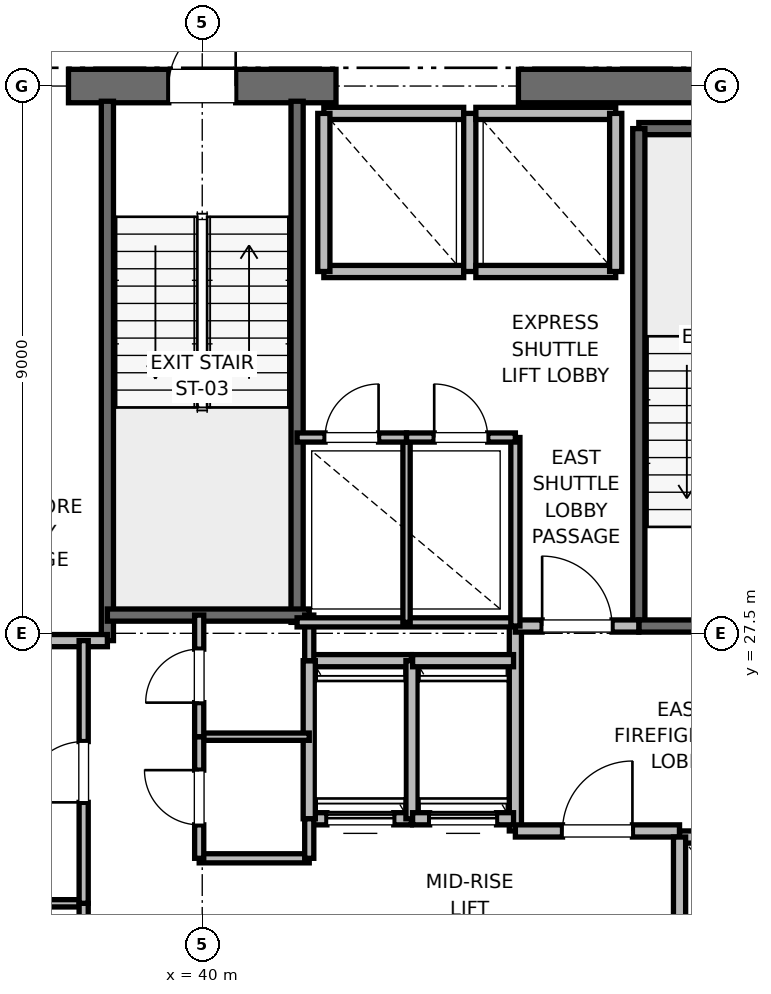
"""IFC4 building model, lengths in metres.
Left out: names, types, materials, properties, quantities, classifications, styles, units other than length and angle.
Written with IfcOpenShell. Run it as: python <this file> out.ifc"""

import sys

from ifc_helpers import new_model, si_unit, direction, frame, frame_2d, origin, place, context, subcontext, project, spatial, rectangle, extrude, element, fill, save


model = new_model("IFC4")
c1 = context("Model", 3, precision=1e-05, world=origin(), true_north=direction((0.0, 1.0)))
c2 = subcontext(c1, "Body", "Model", "MODEL_VIEW")
j1 = project(units=[si_unit("LENGTHUNIT", "METRE"), si_unit("PLANEANGLEUNIT", "RADIAN")], contexts=[c1])
p1 = place(None, origin())
s1 = spatial("IfcSite", under=j1, at=p1, CompositionType="ELEMENT")
p2 = place(p1, origin())
s2 = spatial("IfcBuilding", under=s1, at=p2, CompositionType="ELEMENT")
p3 = place(p2, frame((0.0, 0.0, 168.4)))
s3 = spatial("IfcBuildingStorey", under=s2, at=p3, CompositionType="ELEMENT", Elevation=168.4)
p4 = place(p3, frame((37.8, 36.5, 0.0), z_axis=(0.0, 0.0, 1.0), x_axis=(1.0, 0.0, 0.0)))
e1 = element("IfcWall", 1, at=p4, inside=s3, PredefinedType="SHEAR", context=c2, shape_type="SweptSolid", body=[
    extrude(rectangle(XDim=4.4, YDim=0.55, at=frame_2d((2.2, 0.0))), origin(), (0.0, 0.0, 1.0), 3.775),
])
p5 = place(p4, frame((1.65, 0.0, 0.0)))
e2 = element("IfcOpeningElement", 2, at=p5, cuts=e1, PredefinedType="OPENING", context=c2, shape_type="SweptSolid", body=[
    extrude(rectangle(XDim=1.1, YDim=2.15, at=frame_2d((0.55, 1.075))), frame((0.0, 0.275, 0.0), z_axis=(0.0, -1.0, 0.0), x_axis=(1.0, 0.0, 0.0)), (0.0, 0.0, 1.0), 0.55),
])
p6 = place(p3, frame((45.2, 36.5, 0.0), z_axis=(0.0, 0.0, 1.0), x_axis=(1.0, 0.0, 0.0)))
e3 = element("IfcWall", 3, at=p6, inside=s3, PredefinedType="SHEAR", context=c2, shape_type="SweptSolid", body=[
    extrude(rectangle(XDim=5.8, YDim=0.55, at=frame_2d((2.9, 0.0))), origin(), (0.0, 0.0, 1.0), 3.775),
])
p7 = place(p3, frame((47.18, 35.8, 0.0), z_axis=(0.0, 0.0, 1.0), x_axis=(1.0, 0.0, 0.0)))
e4 = element("IfcWall", 4, at=p7, inside=s3, PredefinedType="SOLIDWALL", context=c2, shape_type="SweptSolid", body=[
    extrude(rectangle(XDim=3.12, YDim=0.2, at=frame_2d((1.56, 0.0))), origin(), (0.0, 0.0, 1.0), 3.775),
])
p8 = place(p3, frame((47.18, 27.62, 0.0), z_axis=(0.0, 0.0, 1.0), x_axis=(0.0, 1.0, 0.0)))
e5 = element("IfcWall", 5, at=p8, inside=s3, PredefinedType="SOLIDWALL", context=c2, shape_type="SweptSolid", body=[
    extrude(rectangle(XDim=8.18, YDim=0.2, at=frame_2d((4.09, 0.0))), origin(), (0.0, 0.0, 1.0), 3.775),
])
p9 = place(p3, frame((47.18, 27.62, 0.0), z_axis=(0.0, 0.0, 1.0), x_axis=(1.0, 0.0, 0.0)))
e6 = element("IfcWall", 6, at=p9, inside=s3, PredefinedType="SOLIDWALL", context=c2, shape_type="SweptSolid", body=[
    extrude(rectangle(XDim=3.12, YDim=0.2, at=frame_2d((1.56, 0.0))), origin(), (0.0, 0.0, 1.0), 3.775),
])
p10 = place(p9, frame((1.01, 0.0, 0.0)))
e7 = element("IfcOpeningElement", 7, at=p10, cuts=e6, PredefinedType="OPENING", context=c2, shape_type="SweptSolid", body=[
    extrude(rectangle(XDim=1.1, YDim=2.15, at=frame_2d((0.55, 1.075))), frame((0.0, 0.1, 0.0), z_axis=(0.0, -1.0, 0.0), x_axis=(1.0, 0.0, 0.0)), (0.0, 0.0, 1.0), 0.2),
])
p11 = place(p3, frame((38.44, 27.38, 0.0), z_axis=(0.0, 0.0, 1.0), x_axis=(0.0, 1.0, 0.0)))
e8 = element("IfcWall", 8, at=p11, inside=s3, PredefinedType="SOLIDWALL", context=c2, shape_type="SweptSolid", body=[
    extrude(rectangle(XDim=8.87, YDim=0.2, at=frame_2d((4.435, 0.0))), origin(), (0.0, 0.0, 1.0), 3.775),
])
p12 = place(p3, frame((41.56, 27.68, 0.0), z_axis=(0.0, 0.0, 1.0), x_axis=(0.0, 1.0, 0.0)))
e9 = element("IfcWall", 9, at=p12, inside=s3, PredefinedType="SOLIDWALL", context=c2, shape_type="SweptSolid", body=[
    extrude(rectangle(XDim=8.57, YDim=0.2, at=frame_2d((4.285, 0.0))), origin(), (0.0, 0.0, 1.0), 3.775),
])
p13 = place(p3, frame((38.44, 27.8, 0.0), z_axis=(0.0, 0.0, 1.0), x_axis=(1.0, 0.0, 0.0)))
e10 = element("IfcWall", 10, at=p13, inside=s3, PredefinedType="SOLIDWALL", context=c2, shape_type="SweptSolid", body=[
    extrude(rectangle(XDim=3.32, YDim=0.2, at=frame_2d((1.66, 0.0))), origin(), (0.0, 0.0, 1.0), 3.775),
])
p14 = place(p3, frame((32.82, 27.38, 0.0), z_axis=(0.0, 0.0, 1.0), x_axis=(1.0, 0.0, 0.0)))
e11 = element("IfcWall", 11, at=p14, inside=s3, PredefinedType="PARTITIONING", context=c2, shape_type="SweptSolid", body=[
    extrude(rectangle(XDim=5.62, YDim=0.2, at=frame_2d((2.81, 0.0))), origin(), (0.0, 0.0, 1.0), 3.775),
])
p15 = place(p3, frame((45.15, 24.25, 0.0), z_axis=(0.0, 0.0, 1.0), x_axis=(0.0, 1.0, 0.0)))
e12 = element("IfcWall", 12, at=p15, inside=s3, PredefinedType="PARTITIONING", context=c2, shape_type="SweptSolid", body=[
    extrude(rectangle(XDim=3.37, YDim=0.2, at=frame_2d((1.685, 0.0))), origin(), (0.0, 0.0, 1.0), 3.775),
])
p16 = place(p3, frame((45.15, 24.25, 0.0), z_axis=(0.0, 0.0, 1.0), x_axis=(1.0, 0.0, 0.0)))
e13 = element("IfcWall", 13, at=p16, inside=s3, PredefinedType="PARTITIONING", context=c2, shape_type="SweptSolid", body=[
    extrude(rectangle(XDim=2.7, YDim=0.2, at=frame_2d((1.35, 0.0))), origin(), (0.0, 0.0, 1.0), 3.775),
])
p17 = place(p16, frame((0.775, 0.0, 0.0)))
e14 = element("IfcOpeningElement", 14, at=p17, cuts=e13, PredefinedType="OPENING", context=c2, shape_type="SweptSolid", body=[
    extrude(rectangle(XDim=1.15, YDim=2.2, at=frame_2d((0.575, 1.1))), frame((0.0, 0.1, 0.0), z_axis=(0.0, -1.0, 0.0), x_axis=(1.0, 0.0, 0.0)), (0.0, 0.0, 1.0), 0.2),
])
p18 = place(p3, frame((45.15, 27.62, 0.0), z_axis=(0.0, 0.0, 1.0), x_axis=(1.0, 0.0, 0.0)))
e15 = element("IfcWall", 15, at=p18, inside=s3, PredefinedType="PARTITIONING", context=c2, shape_type="SweptSolid", body=[
    extrude(rectangle(XDim=2.03, YDim=0.2, at=frame_2d((1.015, 0.0))), origin(), (0.0, 0.0, 1.0), 3.775),
])
p19 = place(p18, frame((0.44, 0.0, 0.0)))
e16 = element("IfcOpeningElement", 16, at=p19, cuts=e15, PredefinedType="OPENING", context=c2, shape_type="SweptSolid", body=[
    extrude(rectangle(XDim=1.15, YDim=2.2, at=frame_2d((0.575, 1.1))), frame((0.0, 0.1, 0.0), z_axis=(0.0, -1.0, 0.0), x_axis=(1.0, 0.0, 0.0)), (0.0, 0.0, 1.0), 0.2),
])
p20 = place(p3, frame((50.45, 24.15, 0.0), z_axis=(0.0, 0.0, 1.0), x_axis=(-1.0, 0.0, 0.0)))
e17 = element("IfcWall", 17, at=p20, inside=s3, PredefinedType="SOLIDWALL", context=c2, shape_type="SweptSolid", body=[
    extrude(rectangle(XDim=2.6, YDim=0.2, at=frame_2d((1.3, 0.0))), origin(), (0.0, 0.0, 1.0), 2.755),
])
p21 = place(p20, frame((0.75, 0.0, 0.0)))
e18 = element("IfcOpeningElement", 18, at=p21, cuts=e17, PredefinedType="OPENING", context=c2, shape_type="SweptSolid", body=[
    extrude(rectangle(XDim=1.1, YDim=2.2, at=frame_2d((0.55, 1.1))), frame((0.0, 0.1, 0.0), z_axis=(0.0, -1.0, 0.0), x_axis=(1.0, 0.0, 0.0)), (0.0, 0.0, 1.0), 0.2),
])
p22 = place(p3, frame((47.85, 24.15, 0.0), z_axis=(0.0, 0.0, 1.0), x_axis=(0.0, -1.0, 0.0)))
e19 = element("IfcWall", 19, at=p22, inside=s3, PredefinedType="SOLIDWALL", context=c2, shape_type="SweptSolid", body=[
    extrude(rectangle(XDim=3.0, YDim=0.2, at=frame_2d((1.5, 0.0))), origin(), (0.0, 0.0, 1.0), 3.775),
])
p23 = place(p3, frame((41.76, 24.45, 0.0), z_axis=(0.0, 0.0, 1.0), x_axis=(1.0, 0.0, 0.0)))
e20 = element("IfcWall", 20, at=p23, inside=s3, PredefinedType="SOLIDWALL", context=c2, shape_type="SweptSolid", body=[
    extrude(rectangle(XDim=1.68, YDim=0.2, at=frame_2d((0.84, 0.0))), origin(), (0.0, 0.0, 1.0), 3.775),
])
p24 = place(p23, frame((0.29, 0.0, 0.0)))
e21 = element("IfcOpeningElement", 21, at=p24, cuts=e20, PredefinedType="OPENING", context=c2, shape_type="SweptSolid", body=[
    extrude(rectangle(XDim=1.1, YDim=2.2, at=frame_2d((0.55, 1.1))), frame((0.0, 0.1, 0.0), z_axis=(0.0, -1.0, 0.0), x_axis=(1.0, 0.0, 0.0)), (0.0, 0.0, 1.0), 0.2),
])
p25 = place(p3, frame((43.44, 27.05, 0.0), z_axis=(0.0, 0.0, 1.0), x_axis=(-1.0, 0.0, 0.0)))
e22 = element("IfcWall", 22, at=p25, inside=s3, PredefinedType="SOLIDWALL", context=c2, shape_type="SweptSolid", body=[
    extrude(rectangle(XDim=1.68, YDim=0.2, at=frame_2d((0.84, 0.0))), origin(), (0.0, 0.0, 1.0), 3.775),
])
for number, where, z_axis, x_axis in (
    (23, (41.76, 27.05, 0.0), (0.0, 0.0, 1.0), (0.0, -1.0, 0.0)),
    (24, (43.45, 24.45, 0.0), (0.0, 0.0, 1.0), (0.0, 1.0, 0.0)),
):
    element("IfcWall", number, at=place(p3, frame(where, z_axis=z_axis, x_axis=x_axis)), inside=s3, PredefinedType="SOLIDWALL", context=c2, shape_type="SweptSolid", body=[
        extrude(rectangle(XDim=2.6, YDim=0.2, at=frame_2d((1.3, 0.0))), origin(), (0.0, 0.0, 1.0), 3.775),
    ])
p26 = place(p3, frame((43.46, 24.45, 0.0), z_axis=(0.0, 0.0, 1.0), x_axis=(1.0, 0.0, 0.0)))
e25 = element("IfcWall", 25, at=p26, inside=s3, PredefinedType="SOLIDWALL", context=c2, shape_type="SweptSolid", body=[
    extrude(rectangle(XDim=1.66, YDim=0.2, at=frame_2d((0.83, 0.0))), origin(), (0.0, 0.0, 1.0), 3.775),
])
p27 = place(p26, frame((0.28, 0.0, 0.0)))
e26 = element("IfcOpeningElement", 26, at=p27, cuts=e25, PredefinedType="OPENING", context=c2, shape_type="SweptSolid", body=[
    extrude(rectangle(XDim=1.1, YDim=2.2, at=frame_2d((0.55, 1.1))), frame((0.0, 0.1, 0.0), z_axis=(0.0, -1.0, 0.0), x_axis=(1.0, 0.0, 0.0)), (0.0, 0.0, 1.0), 0.2),
])
p28 = place(p3, frame((45.12, 27.05, 0.0), z_axis=(0.0, 0.0, 1.0), x_axis=(-1.0, 0.0, 0.0)))
e27 = element("IfcWall", 27, at=p28, inside=s3, PredefinedType="SOLIDWALL", context=c2, shape_type="SweptSolid", body=[
    extrude(rectangle(XDim=1.66, YDim=0.2, at=frame_2d((0.83, 0.0))), origin(), (0.0, 0.0, 1.0), 3.775),
])
p29 = place(p3, frame((42.0, 33.45, 0.0), z_axis=(0.0, 0.0, 1.0), x_axis=(1.0, 0.0, 0.0)))
e28 = element("IfcWall", 28, at=p29, inside=s3, PredefinedType="SOLIDWALL", context=c2, shape_type="SweptSolid", body=[
    extrude(rectangle(XDim=2.3, YDim=0.2, at=frame_2d((1.15, 0.0))), origin(), (0.0, 0.0, 1.0), 3.775),
])
p30 = place(p3, frame((44.3, 36.05, 0.0), z_axis=(0.0, 0.0, 1.0), x_axis=(-1.0, 0.0, 0.0)))
e29 = element("IfcWall", 29, at=p30, inside=s3, PredefinedType="SOLIDWALL", context=c2, shape_type="SweptSolid", body=[
    extrude(rectangle(XDim=2.3, YDim=0.2, at=frame_2d((1.15, 0.0))), origin(), (0.0, 0.0, 1.0), 2.755),
])
for number, where, z_axis, x_axis in (
    (30, (42.0, 36.05, 0.0), (0.0, 0.0, 1.0), (0.0, -1.0, 0.0)),
    (31, (44.4, 33.45, 0.0), (0.0, 0.0, 1.0), (0.0, 1.0, 0.0)),
):
    element("IfcWall", number, at=place(p3, frame(where, z_axis=z_axis, x_axis=x_axis)), inside=s3, PredefinedType="SOLIDWALL", context=c2, shape_type="SweptSolid", body=[
        extrude(rectangle(XDim=2.6, YDim=0.2, at=frame_2d((1.3, 0.0))), origin(), (0.0, 0.0, 1.0), 2.755),
    ])
p31 = place(p3, frame((44.5, 33.45, 0.0), z_axis=(0.0, 0.0, 1.0), x_axis=(1.0, 0.0, 0.0)))
e32 = element("IfcWall", 32, at=p31, inside=s3, PredefinedType="SOLIDWALL", context=c2, shape_type="SweptSolid", body=[
    extrude(rectangle(XDim=2.3, YDim=0.2, at=frame_2d((1.15, 0.0))), origin(), (0.0, 0.0, 1.0), 3.775),
])
p32 = place(p3, frame((46.8, 36.05, 0.0), z_axis=(0.0, 0.0, 1.0), x_axis=(-1.0, 0.0, 0.0)))
e33 = element("IfcWall", 33, at=p32, inside=s3, PredefinedType="SOLIDWALL", context=c2, shape_type="SweptSolid", body=[
    extrude(rectangle(XDim=2.3, YDim=0.2, at=frame_2d((1.15, 0.0))), origin(), (0.0, 0.0, 1.0), 2.755),
])
p33 = place(p3, frame((46.8, 33.45, 0.0), z_axis=(0.0, 0.0, 1.0), x_axis=(0.0, 1.0, 0.0)))
e34 = element("IfcWall", 34, at=p33, inside=s3, PredefinedType="SOLIDWALL", context=c2, shape_type="SweptSolid", body=[
    extrude(rectangle(XDim=2.6, YDim=0.2, at=frame_2d((1.3, 0.0))), origin(), (0.0, 0.0, 1.0), 3.775),
])
p34 = place(p3, frame((39.95, 23.8, 0.0), z_axis=(0.0, 0.0, 1.0), x_axis=(1.0, 0.0, 0.0)))
e35 = element("IfcWall", 35, at=p34, inside=s3, PredefinedType="PARTITIONING", context=c2, shape_type="SweptSolid", body=[
    extrude(rectangle(XDim=1.81, YDim=0.15, at=frame_2d((0.905, 0.0))), origin(), (0.0, 0.0, 1.0), 2.85),
])
p35 = place(p3, frame((39.95, 25.8, 0.0), z_axis=(0.0, 0.0, 1.0), x_axis=(1.0, 0.0, 0.0)))
e36 = element("IfcWall", 36, at=p35, inside=s3, PredefinedType="PARTITIONING", context=c2, shape_type="SweptSolid", body=[
    extrude(rectangle(XDim=1.81, YDim=0.12, at=frame_2d((0.905, 0.0))), origin(), (0.0, 0.0, 1.0), 2.85),
])
p36 = place(p3, frame((41.76, 23.8, 0.0), z_axis=(0.0, 0.0, 1.0), x_axis=(0.0, 1.0, 0.0)))
e37 = element("IfcWall", 37, at=p36, inside=s3, PredefinedType="PARTITIONING", context=c2, shape_type="SweptSolid", body=[
    extrude(rectangle(XDim=0.65, YDim=0.15, at=frame_2d((0.325, 0.0))), origin(), (0.0, 0.0, 1.0), 2.85),
])
p37 = place(p3, frame((41.76, 27.05, 0.0), z_axis=(0.0, 0.0, 1.0), x_axis=(0.0, 1.0, 0.0)))
e38 = element("IfcWall", 38, at=p37, inside=s3, PredefinedType="PARTITIONING", context=c2, shape_type="SweptSolid", body=[
    extrude(rectangle(XDim=0.75, YDim=0.15, at=frame_2d((0.375, 0.0))), origin(), (0.0, 0.0, 1.0), 2.85),
])
p38 = place(p3, frame((39.95, 23.8, 0.0), z_axis=(0.0, 0.0, 1.0), x_axis=(0.0, 1.0, 0.0)))
e39 = element("IfcWall", 39, at=p38, inside=s3, PredefinedType="PARTITIONING", context=c2, shape_type="SweptSolid", body=[
    extrude(rectangle(XDim=2.0, YDim=0.15, at=frame_2d((1.0, 0.0))), origin(), (0.0, 0.0, 1.0), 2.85),
])
p39 = place(p38, frame((0.55, 0.0, 0.0)))
e40 = element("IfcOpeningElement", 40, at=p39, cuts=e39, PredefinedType="OPENING", context=c2, shape_type="SweptSolid", body=[
    extrude(rectangle(XDim=0.9, YDim=2.1, at=frame_2d((0.45, 1.05))), frame((0.0, 0.075, 0.0), z_axis=(0.0, -1.0, 0.0), x_axis=(1.0, 0.0, 0.0)), (0.0, 0.0, 1.0), 0.15),
])
p40 = place(p3, frame((39.95, 25.8, 0.0), z_axis=(0.0, 0.0, 1.0), x_axis=(0.0, 1.0, 0.0)))
e41 = element("IfcWall", 41, at=p40, inside=s3, PredefinedType="PARTITIONING", context=c2, shape_type="SweptSolid", body=[
    extrude(rectangle(XDim=2.0, YDim=0.15, at=frame_2d((1.0, 0.0))), origin(), (0.0, 0.0, 1.0), 2.85),
])
p41 = place(p40, frame((0.56, 0.0, 0.0)))
e42 = element("IfcOpeningElement", 42, at=p41, cuts=e41, PredefinedType="OPENING", context=c2, shape_type="SweptSolid", body=[
    extrude(rectangle(XDim=0.88, YDim=2.1, at=frame_2d((0.44, 1.05))), frame((0.0, 0.075, 0.0), z_axis=(0.0, -1.0, 0.0), x_axis=(1.0, 0.0, 0.0)), (0.0, 0.0, 1.0), 0.15),
])
p42 = place(p3, frame((32.82, 23.06, 0.0), z_axis=(0.0, 0.0, 1.0), x_axis=(1.0, 0.0, 0.0)))
e43 = element("IfcWall", 43, at=p42, inside=s3, PredefinedType="PARTITIONING", context=c2, shape_type="SweptSolid", body=[
    extrude(rectangle(XDim=5.23, YDim=0.12, at=frame_2d((2.615, 0.0))), origin(), (0.0, 0.0, 1.0), 2.85),
])
p43 = place(p3, frame((38.05, 18.6, 0.0), z_axis=(0.0, 0.0, 1.0), x_axis=(0.0, 1.0, 0.0)))
e44 = element("IfcWall", 44, at=p43, inside=s3, PredefinedType="PARTITIONING", context=c2, shape_type="SweptSolid", body=[
    extrude(rectangle(XDim=4.46, YDim=0.15, at=frame_2d((2.23, 0.0))), origin(), (0.0, 0.0, 1.0), 2.755),
])
p44 = place(p43, frame((1.73, 0.0, 0.0)))
e45 = element("IfcOpeningElement", 45, at=p44, cuts=e44, PredefinedType="OPENING", context=c2, shape_type="SweptSolid", body=[
    extrude(rectangle(XDim=1.0, YDim=2.15, at=frame_2d((0.5, 1.075))), frame((0.0, 0.075, 0.0), z_axis=(0.0, -1.0, 0.0), x_axis=(1.0, 0.0, 0.0)), (0.0, 0.0, 1.0), 0.15),
])
p45 = place(p3, frame((38.05, 23.06, 0.0), z_axis=(0.0, 0.0, 1.0), x_axis=(0.0, 1.0, 0.0)))
e46 = element("IfcWall", 46, at=p45, inside=s3, PredefinedType="PARTITIONING", context=c2, shape_type="SweptSolid", body=[
    extrude(rectangle(XDim=4.32, YDim=0.15, at=frame_2d((2.16, 0.0))), origin(), (0.0, 0.0, 1.0), 2.85),
])
p46 = place(p45, frame((1.66, 0.0, 0.0)))
e47 = element("IfcOpeningElement", 47, at=p46, cuts=e46, PredefinedType="OPENING", context=c2, shape_type="SweptSolid", body=[
    extrude(rectangle(XDim=1.0, YDim=2.15, at=frame_2d((0.5, 1.075))), frame((0.0, 0.075, 0.0), z_axis=(0.0, -1.0, 0.0), x_axis=(1.0, 0.0, 0.0)), (0.0, 0.0, 1.0), 0.15),
])
p47 = place(p3, frame((41.56, 27.68, 0.0), z_axis=(0.0, 0.0, 1.0), x_axis=(1.0, 0.0, 0.0)))
e48 = element("IfcWall", 48, at=p47, inside=s3, PredefinedType="PARTITIONING", context=c2, shape_type="SweptSolid", body=[
    extrude(rectangle(XDim=3.59, YDim=0.15, at=frame_2d((1.795, 0.0))), origin(), (0.0, 0.0, 1.0), 2.85),
])
p48 = place(p3, frame((45.15, 27.62, 0.0), z_axis=(0.0, 0.0, 1.0), x_axis=(0.0, 1.0, 0.0)))
e49 = element("IfcWall", 49, at=p48, inside=s3, PredefinedType="PARTITIONING", context=c2, shape_type="SweptSolid", body=[
    extrude(rectangle(XDim=3.1, YDim=0.15, at=frame_2d((1.55, 0.0))), origin(), (0.0, 0.0, 1.0), 2.85),
])
p49 = place(p3, frame((43.36, 27.68, 0.0), z_axis=(0.0, 0.0, 1.0), x_axis=(0.0, 1.0, 0.0)))
e50 = element("IfcWall", 50, at=p49, inside=s3, PredefinedType="PARTITIONING", context=c2, shape_type="SweptSolid", body=[
    extrude(rectangle(XDim=3.04, YDim=0.12, at=frame_2d((1.52, 0.0))), origin(), (0.0, 0.0, 1.0), 2.85),
])
p50 = place(p3, frame((41.56, 30.72, 0.0), z_axis=(0.0, 0.0, 1.0), x_axis=(1.0, 0.0, 0.0)))
e51 = element("IfcWall", 51, at=p50, inside=s3, PredefinedType="PARTITIONING", context=c2, shape_type="SweptSolid", body=[
    extrude(rectangle(XDim=1.8, YDim=0.15, at=frame_2d((0.9, 0.0))), origin(), (0.0, 0.0, 1.0), 2.85),
])
p51 = place(p50, frame((0.46, 0.0, 0.0)))
e52 = element("IfcOpeningElement", 52, at=p51, cuts=e51, PredefinedType="OPENING", context=c2, shape_type="SweptSolid", body=[
    extrude(rectangle(XDim=0.88, YDim=2.1, at=frame_2d((0.44, 1.05))), frame((0.0, 0.075, 0.0), z_axis=(0.0, -1.0, 0.0), x_axis=(1.0, 0.0, 0.0)), (0.0, 0.0, 1.0), 0.15),
])
p52 = place(p3, frame((43.36, 30.72, 0.0), z_axis=(0.0, 0.0, 1.0), x_axis=(1.0, 0.0, 0.0)))
e53 = element("IfcWall", 53, at=p52, inside=s3, PredefinedType="PARTITIONING", context=c2, shape_type="SweptSolid", body=[
    extrude(rectangle(XDim=1.79, YDim=0.15, at=frame_2d((0.895, 0.0))), origin(), (0.0, 0.0, 1.0), 2.85),
])
p53 = place(p52, frame((0.455, 0.0, 0.0)))
e54 = element("IfcOpeningElement", 54, at=p53, cuts=e53, PredefinedType="OPENING", context=c2, shape_type="SweptSolid", body=[
    extrude(rectangle(XDim=0.88, YDim=2.1, at=frame_2d((0.44, 1.05))), frame((0.0, 0.075, 0.0), z_axis=(0.0, -1.0, 0.0), x_axis=(1.0, 0.0, 0.0)), (0.0, 0.0, 1.0), 0.15),
])
p54 = place(p5, origin())
e55 = element("IfcDoor", 55, at=p54, inside=s3, OperationType="SINGLE_SWING_RIGHT", PredefinedType="DOOR", context=c2, shape_type="SweptSolid", body=[
    extrude(rectangle(XDim=1.1, YDim=2.15, at=frame_2d((0.55, 1.075))), frame((0.0, 0.025, 0.0), z_axis=(0.0, -1.0, 0.0), x_axis=(1.0, 0.0, 0.0)), (0.0, 0.0, 1.0), 0.05),
])
fill(e2, e55)
p55 = place(p17, origin())
e56 = element("IfcDoor", 56, at=p55, inside=s3, OperationType="SINGLE_SWING_RIGHT", PredefinedType="DOOR", context=c2, shape_type="SweptSolid", body=[
    extrude(rectangle(XDim=1.15, YDim=2.2, at=frame_2d((0.575, 1.1))), frame((0.0, 0.025, 0.0), z_axis=(0.0, -1.0, 0.0), x_axis=(1.0, 0.0, 0.0)), (0.0, 0.0, 1.0), 0.05),
])
fill(e14, e56)
p56 = place(p19, origin())
e57 = element("IfcDoor", 57, at=p56, inside=s3, OperationType="SINGLE_SWING_LEFT", PredefinedType="DOOR", context=c2, shape_type="SweptSolid", body=[
    extrude(rectangle(XDim=1.15, YDim=2.2, at=frame_2d((0.575, 1.1))), frame((0.0, 0.025, 0.0), z_axis=(0.0, -1.0, 0.0), x_axis=(1.0, 0.0, 0.0)), (0.0, 0.0, 1.0), 0.05),
])
fill(e16, e57)
p57 = place(p24, origin())
e58 = element("IfcDoor", 58, at=p57, inside=s3, OperationType="SLIDING_TO_RIGHT", PredefinedType="DOOR", context=c2, shape_type="SweptSolid", body=[
    extrude(rectangle(XDim=1.1, YDim=2.2, at=frame_2d((0.55, 1.1))), frame((0.0, 0.025, 0.0), z_axis=(0.0, -1.0, 0.0), x_axis=(1.0, 0.0, 0.0)), (0.0, 0.0, 1.0), 0.05),
])
fill(e21, e58)
p58 = place(p27, origin())
e59 = element("IfcDoor", 59, at=p58, inside=s3, OperationType="SLIDING_TO_RIGHT", PredefinedType="DOOR", context=c2, shape_type="SweptSolid", body=[
    extrude(rectangle(XDim=1.1, YDim=2.2, at=frame_2d((0.55, 1.1))), frame((0.0, 0.025, 0.0), z_axis=(0.0, -1.0, 0.0), x_axis=(1.0, 0.0, 0.0)), (0.0, 0.0, 1.0), 0.05),
])
fill(e26, e59)
p59 = place(p39, origin())
e60 = element("IfcDoor", 60, at=p59, inside=s3, OperationType="SINGLE_SWING_RIGHT", PredefinedType="DOOR", context=c2, shape_type="SweptSolid", body=[
    extrude(rectangle(XDim=0.9, YDim=2.1, at=frame_2d((0.45, 1.05))), frame((0.0, 0.025, 0.0), z_axis=(0.0, -1.0, 0.0), x_axis=(1.0, 0.0, 0.0)), (0.0, 0.0, 1.0), 0.05),
])
fill(e40, e60)
p60 = place(p41, origin())
e61 = element("IfcDoor", 61, at=p60, inside=s3, OperationType="SINGLE_SWING_LEFT", PredefinedType="DOOR", context=c2, shape_type="SweptSolid", body=[
    extrude(rectangle(XDim=0.88, YDim=2.1, at=frame_2d((0.44, 1.05))), frame((0.0, 0.025, 0.0), z_axis=(0.0, -1.0, 0.0), x_axis=(1.0, 0.0, 0.0)), (0.0, 0.0, 1.0), 0.05),
])
fill(e42, e61)
p61 = place(p46, origin())
e62 = element("IfcDoor", 62, at=p61, inside=s3, OperationType="SINGLE_SWING_LEFT", PredefinedType="DOOR", context=c2, shape_type="SweptSolid", body=[
    extrude(rectangle(XDim=1.0, YDim=2.15, at=frame_2d((0.5, 1.075))), frame((0.0, 0.025, 0.0), z_axis=(0.0, -1.0, 0.0), x_axis=(1.0, 0.0, 0.0)), (0.0, 0.0, 1.0), 0.05),
])
fill(e47, e62)
p62 = place(p51, origin())
e63 = element("IfcDoor", 63, at=p62, inside=s3, OperationType="SINGLE_SWING_RIGHT", PredefinedType="DOOR", context=c2, shape_type="SweptSolid", body=[
    extrude(rectangle(XDim=0.88, YDim=2.1, at=frame_2d((0.44, 1.05))), frame((0.0, 0.025, 0.0), z_axis=(0.0, -1.0, 0.0), x_axis=(1.0, 0.0, 0.0)), (0.0, 0.0, 1.0), 0.05),
])
fill(e52, e63)
p63 = place(p53, origin())
e64 = element("IfcDoor", 64, at=p63, inside=s3, OperationType="SINGLE_SWING_LEFT", PredefinedType="DOOR", context=c2, shape_type="SweptSolid", body=[
    extrude(rectangle(XDim=0.88, YDim=2.1, at=frame_2d((0.44, 1.05))), frame((0.0, 0.025, 0.0), z_axis=(0.0, -1.0, 0.0), x_axis=(1.0, 0.0, 0.0)), (0.0, 0.0, 1.0), 0.05),
])
fill(e54, e64)
save(model, sys.argv[1])
